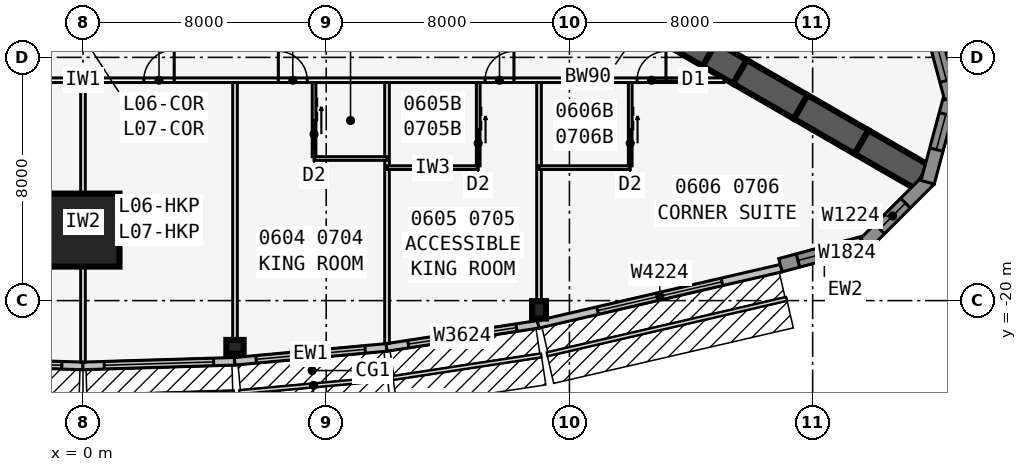
"""IFC4 building model, lengths in metres.
Left out: names, types, materials, properties, quantities, classifications, styles, units other than length and angle.
Written with IfcOpenShell. Run it as: python <this file> out.ifc"""

import sys

from ifc_helpers import new_model, si_unit, direction, frame, frame_2d, origin, origin_2d, place, context, subcontext, project, spatial, polyline, rectangle, i_section, outline, extrude, element, fill, save


model = new_model("IFC4")
c1 = context("Model", 3, precision=1e-05, world=origin(), true_north=direction((0.0, 1.0)))
c2 = subcontext(c1, "Body", "Model", "MODEL_VIEW")
j1 = project(units=[si_unit("LENGTHUNIT", "METRE"), si_unit("PLANEANGLEUNIT", "RADIAN")], contexts=[c1])
p1 = place(None, origin())
s1 = spatial("IfcSite", under=j1, at=p1, CompositionType="ELEMENT")
p2 = place(p1, origin())
s2 = spatial("IfcBuilding", under=s1, at=p2, CompositionType="ELEMENT")
p3 = place(p2, frame((0.0, 0.0, 31.9)))
s3 = spatial("IfcBuildingStorey", under=s2, at=p3, CompositionType="ELEMENT", Elevation=31.9)
p4 = place(p3, frame((16.5, -9.526, 0.0), z_axis=(0.0, 0.0, 1.0), x_axis=(0.866031398331, -0.499989616998, 0.0)))
e1 = element("IfcWall", 1, at=p4, inside=s3, PredefinedType="SHEAR", context=c2, shape_type="SweptSolid", body=[
    extrude(rectangle(XDim=4.746, YDim=0.9, at=frame_2d((2.373, 0.0))), origin(), (0.0, 0.0, 1.0), 3.4),
])
p5 = place(p4, frame((1.8, 0.0, 0.0)))
e2 = element("IfcOpeningElement", 2, at=p5, cuts=e1, PredefinedType="OPENING", context=c2, shape_type="SweptSolid", body=[
    extrude(rectangle(XDim=1.8, YDim=2.13, at=frame_2d((0.9, 1.065))), frame((0.0, 0.46, 0.0), z_axis=(0.0, -1.0, 0.0), x_axis=(1.0, 0.0, 0.0)), (0.0, 0.0, 1.0), 0.92),
])
p6 = place(p3, frame((20.61, -11.899, 0.0), z_axis=(0.0, 0.0, 1.0), x_axis=(0.866009537788, -0.500027479704, 0.0)))
e3 = element("IfcWall", 3, at=p6, inside=s3, PredefinedType="SHEAR", context=c2, shape_type="SweptSolid", body=[
    extrude(rectangle(XDim=1.155, YDim=0.9, at=frame_2d((0.577, 0.0))), origin(), (0.0, 0.0, 1.0), 3.4),
])
for number, where, z_axis, x_axis in (
    (4, (21.61, -12.477, 0.0), (0.0, 0.0, 1.0), (0.866, -0.5, 0.0)),
    (5, (23.61, -13.631, 0.0), (0.0, 0.0, 1.0), (0.866, -0.5, 0.0)),
    (6, (25.61, -14.786, 0.0), (0.0, 0.0, 1.0), (0.866, -0.5, 0.0)),
):
    element("IfcWall", number, at=place(p3, frame(where, z_axis=z_axis, x_axis=x_axis)), inside=s3, PredefinedType="SHEAR", context=c2, shape_type="SweptSolid", body=[
        extrude(rectangle(XDim=2.309, YDim=0.9, at=frame_2d((1.155, 0.0))), origin(), (0.0, 0.0, 1.0), 3.4),
    ])
for number, where, z_axis, x_axis in (
    (7, (5.0, -21.521, 0.0), (0.0, 0.0, 1.0), (0.0, -1.0, 0.0)),
    (8, (15.0, -20.303, 0.0), (0.0, 0.0, 1.0), (1.0, 0.0, 0.0)),
):
    element("IfcColumn", number, at=place(p3, frame(where, z_axis=z_axis, x_axis=x_axis)), inside=s3, PredefinedType="COLUMN", context=c2, shape_type="SweptSolid", body=[
        extrude(i_section(OverallWidth=0.455, OverallDepth=0.569, WebThickness=0.078, FlangeThickness=0.125, at=origin_2d()), origin(), (0.0, 0.0, 1.0), 3.4),
    ])
p7 = place(p3, frame((0.0, -17.68, 0.0), z_axis=(0.0, 0.0, 1.0), x_axis=(0.0, -1.0, 0.0)))
e9 = element("IfcColumn", 9, at=p7, inside=s3, PredefinedType="COLUMN", context=c2, shape_type="SweptSolid", body=[
    extrude(rectangle(XDim=2.4, YDim=2.4, at=origin_2d()), origin(), (0.0, 0.0, 1.0), 3.4),
])
p8 = place(p3, frame((-4.996, -21.996, 0.0), z_axis=(0.0, 0.0, 1.0), x_axis=(0.999537635046, -0.030405856769, 0.0)))
e10 = element("IfcWall", 10, at=p8, inside=s3, PredefinedType="STANDARD", context=c2, shape_type="SweptSolid", body=[
    extrude(rectangle(XDim=5.002, YDim=0.25, at=frame_2d((2.501, 0.0))), origin(), (0.0, 0.0, 1.0), 3.235),
])
p9 = place(p8, frame((0.701, 0.0, 0.45)))
e11 = element("IfcOpeningElement", 11, at=p9, cuts=e10, PredefinedType="OPENING", context=c2, shape_type="SweptSolid", body=[
    extrude(rectangle(XDim=3.6, YDim=2.4, at=frame_2d((1.8, 1.2))), frame((0.0, 0.135, 0.0), z_axis=(0.0, -1.0, 0.0), x_axis=(1.0, 0.0, 0.0)), (0.0, 0.0, 1.0), 0.27),
])
p10 = place(p3, frame((-0.004, -22.148, 0.0), z_axis=(0.0, 0.0, 1.0), x_axis=(0.999537635046, 0.030405856769, 0.0)))
e12 = element("IfcWall", 12, at=p10, inside=s3, PredefinedType="STANDARD", context=c2, shape_type="SweptSolid", body=[
    extrude(rectangle(XDim=5.002, YDim=0.25, at=frame_2d((2.501, 0.0))), origin(), (0.0, 0.0, 1.0), 3.235),
])
p11 = place(p10, frame((0.701, 0.0, 0.45)))
e13 = element("IfcOpeningElement", 13, at=p11, cuts=e12, PredefinedType="OPENING", context=c2, shape_type="SweptSolid", body=[
    extrude(rectangle(XDim=3.6, YDim=2.4, at=frame_2d((1.8, 1.2))), frame((0.0, 0.135, 0.0), z_axis=(0.0, -1.0, 0.0), x_axis=(1.0, 0.0, 0.0)), (0.0, 0.0, 1.0), 0.27),
])
p12 = place(p3, frame((4.989, -21.996, 0.0), z_axis=(0.0, 0.0, 1.0), x_axis=(0.995857256774, 0.090930325692, 0.0)))
e14 = element("IfcWall", 14, at=p12, inside=s3, PredefinedType="STANDARD", context=c2, shape_type="SweptSolid", body=[
    extrude(rectangle(XDim=5.021, YDim=0.25, at=frame_2d((2.51, 0.0))), origin(), (0.0, 0.0, 1.0), 3.235),
])
p13 = place(p12, frame((0.71, 0.0, 0.45)))
e15 = element("IfcOpeningElement", 15, at=p13, cuts=e14, PredefinedType="OPENING", context=c2, shape_type="SweptSolid", body=[
    extrude(rectangle(XDim=3.6, YDim=2.4, at=frame_2d((1.8, 1.2))), frame((0.0, 0.135, 0.0), z_axis=(0.0, -1.0, 0.0), x_axis=(1.0, 0.0, 0.0)), (0.0, 0.0, 1.0), 0.27),
])
p14 = place(p3, frame((9.981, -21.54, 0.0), z_axis=(0.0, 0.0, 1.0), x_axis=(0.988615403399, 0.150464561152, 0.0)))
e16 = element("IfcWall", 16, at=p14, inside=s3, PredefinedType="STANDARD", context=c2, shape_type="SweptSolid", body=[
    extrude(rectangle(XDim=5.058, YDim=0.25, at=frame_2d((2.529, 0.0))), origin(), (0.0, 0.0, 1.0), 3.235),
])
p15 = place(p14, frame((0.729, 0.0, 0.45)))
e17 = element("IfcOpeningElement", 17, at=p15, cuts=e16, PredefinedType="OPENING", context=c2, shape_type="SweptSolid", body=[
    extrude(rectangle(XDim=3.6, YDim=2.4, at=frame_2d((1.8, 1.2))), frame((0.0, 0.135, 0.0), z_axis=(0.0, -1.0, 0.0), x_axis=(1.0, 0.0, 0.0)), (0.0, 0.0, 1.0), 0.27),
])
p16 = place(p3, frame((14.972, -20.781, 0.0), z_axis=(0.0, 0.0, 1.0), x_axis=(0.974279327392, 0.225343720163, 0.0)))
e18 = element("IfcWall", 18, at=p16, inside=s3, PredefinedType="STANDARD", context=c2, shape_type="SweptSolid", body=[
    extrude(rectangle(XDim=8.211, YDim=0.25, at=frame_2d((4.105, 0.0))), origin(), (0.0, 0.0, 1.0), 3.235),
])
p17 = place(p16, frame((2.006, 0.0, 0.45)))
e19 = element("IfcOpeningElement", 19, at=p17, cuts=e18, PredefinedType="OPENING", context=c2, shape_type="SweptSolid", body=[
    extrude(rectangle(XDim=4.2, YDim=2.4, at=frame_2d((2.1, 1.2))), frame((0.0, 0.135, 0.0), z_axis=(0.0, -1.0, 0.0), x_axis=(1.0, 0.0, 0.0)), (0.0, 0.0, 1.0), 0.27),
])
p18 = place(p3, frame((22.942, -18.835, 0.0), z_axis=(0.0, 0.0, 1.0), x_axis=(0.965930548995, 0.258801419081, 0.0)))
e20 = element("IfcWall", 20, at=p18, inside=s3, PredefinedType="SOLIDWALL", context=c2, shape_type="SweptSolid", body=[
    extrude(rectangle(XDim=2.989, YDim=0.45, at=frame_2d((1.494, 0.0))), origin(), (0.0, 0.0, 1.0), 3.235),
])
p19 = place(p18, frame((0.594, 0.0, 0.45)))
e21 = element("IfcOpeningElement", 21, at=p19, cuts=e20, PredefinedType="OPENING", context=c2, shape_type="SweptSolid", body=[
    extrude(rectangle(XDim=1.8, YDim=2.4, at=frame_2d((0.9, 1.2))), frame((0.0, 0.235, 0.0), z_axis=(0.0, -1.0, 0.0), x_axis=(1.0, 0.0, 0.0)), (0.0, 0.0, 1.0), 0.47),
])
p20 = place(p3, frame((25.728, -18.12, 0.0), z_axis=(0.0, 0.0, 1.0), x_axis=(0.707025086683, 0.707188466253, 0.0)))
e22 = element("IfcWall", 22, at=p20, inside=s3, PredefinedType="SOLIDWALL", context=c2, shape_type="SweptSolid", body=[
    extrude(outline(polyline([(2.989, 0.225), (2.93, 0.225), (2.438, 0.093), (2.402, 0.225), (0.0, 0.225), (0.0, -0.225), (2.989, -0.225), (2.989, 0.225)])), origin(), (0.0, 0.0, 1.0), 3.235),
])
p21 = place(p20, frame((0.676, 0.0, 0.45)))
e23 = element("IfcOpeningElement", 23, at=p21, cuts=e22, PredefinedType="OPENING", context=c2, shape_type="SweptSolid", body=[
    extrude(rectangle(XDim=1.2, YDim=2.4, at=frame_2d((0.6, 1.2))), frame((0.0, 0.235, 0.0), z_axis=(0.0, -1.0, 0.0), x_axis=(1.0, 0.0, 0.0)), (0.0, 0.0, 1.0), 0.47),
])
p22 = place(p3, frame((27.783, -16.108, 0.0), z_axis=(0.0, 0.0, 1.0), x_axis=(0.258801419081, 0.965930548995, 0.0)))
e24 = element("IfcWall", 24, at=p22, inside=s3, PredefinedType="SOLIDWALL", context=c2, shape_type="SweptSolid", body=[
    extrude(outline(polyline([(2.989, 0.225), (0.586, 0.225), (0.551, 0.093), (0.06, 0.225), (0.0, 0.225), (0.0, -0.225), (2.989, -0.225), (2.989, 0.225)])), origin(), (0.0, 0.0, 1.0), 3.235),
])
p23 = place(p22, frame((1.113, 0.0, 0.45)))
e25 = element("IfcOpeningElement", 25, at=p23, cuts=e24, PredefinedType="OPENING", context=c2, shape_type="SweptSolid", body=[
    extrude(rectangle(XDim=1.2, YDim=2.4, at=frame_2d((0.6, 1.2))), frame((0.0, 0.235, 0.0), z_axis=(0.0, -1.0, 0.0), x_axis=(1.0, 0.0, 0.0)), (0.0, 0.0, 1.0), 0.47),
])
p24 = place(p3, frame((28.556, -13.337, 0.0), z_axis=(0.0, 0.0, 1.0), x_axis=(-0.258780998834, 0.965936019953, 0.0)))
e26 = element("IfcWall", 26, at=p24, inside=s3, PredefinedType="SOLIDWALL", context=c2, shape_type="SweptSolid", body=[
    extrude(rectangle(XDim=2.989, YDim=0.45, at=frame_2d((1.494, 0.0))), origin(), (0.0, 0.0, 1.0), 3.235),
])
p25 = place(p24, frame((0.594, 0.0, 0.45)))
e27 = element("IfcOpeningElement", 27, at=p25, cuts=e26, PredefinedType="OPENING", context=c2, shape_type="SweptSolid", body=[
    extrude(rectangle(XDim=1.8, YDim=2.4, at=frame_2d((0.9, 1.2))), frame((0.0, 0.235, 0.0), z_axis=(0.0, -1.0, 0.0), x_axis=(1.0, 0.0, 0.0)), (0.0, 0.0, 1.0), 0.47),
])
p26 = place(p3, frame((-21.086, -12.751, 0.0), z_axis=(0.0, 0.0, 1.0), x_axis=(1.0, 0.0, 0.0)))
e28 = element("IfcWall", 28, at=p26, inside=s3, PredefinedType="PARTITIONING", context=c2, shape_type="SweptSolid", body=[
    extrude(rectangle(XDim=42.172, YDim=0.15, at=frame_2d((21.086, 0.0))), origin(), (0.0, 0.0, 1.0), 3.235),
])
p27 = place(p26, frame((2.338, 0.0, 0.0)))
e29 = element("IfcOpeningElement", 29, at=p27, cuts=e28, PredefinedType="OPENING", context=c2, shape_type="SweptSolid", body=[
    extrude(rectangle(XDim=0.95, YDim=2.13, at=frame_2d((0.475, 1.065))), frame((0.0, 0.085, 0.0), z_axis=(0.0, -1.0, 0.0), x_axis=(1.0, 0.0, 0.0)), (0.0, 0.0, 1.0), 0.17),
])
p28 = place(p26, frame((12.511, 0.0, 0.0)))
e30 = element("IfcOpeningElement", 30, at=p28, cuts=e28, PredefinedType="OPENING", context=c2, shape_type="SweptSolid", body=[
    extrude(rectangle(XDim=0.95, YDim=2.13, at=frame_2d((0.475, 1.065))), frame((0.0, 0.085, 0.0), z_axis=(0.0, -1.0, 0.0), x_axis=(1.0, 0.0, 0.0)), (0.0, 0.0, 1.0), 0.17),
])
p29 = place(p26, frame((18.711, 0.0, 0.0)))
e31 = element("IfcOpeningElement", 31, at=p29, cuts=e28, PredefinedType="OPENING", context=c2, shape_type="SweptSolid", body=[
    extrude(rectangle(XDim=0.95, YDim=2.13, at=frame_2d((0.475, 1.065))), frame((0.0, 0.085, 0.0), z_axis=(0.0, -1.0, 0.0), x_axis=(1.0, 0.0, 0.0)), (0.0, 0.0, 1.0), 0.17),
])
p30 = place(p26, frame((23.086, 0.0, 0.0)))
e32 = element("IfcOpeningElement", 32, at=p30, cuts=e28, PredefinedType="OPENING", context=c2, shape_type="SweptSolid", body=[
    extrude(rectangle(XDim=1.0, YDim=2.13, at=frame_2d((0.5, 1.065))), frame((0.0, 0.085, 0.0), z_axis=(0.0, -1.0, 0.0), x_axis=(1.0, 0.0, 0.0)), (0.0, 0.0, 1.0), 0.17),
])
p31 = place(p26, frame((27.511, 0.0, 0.0)))
e33 = element("IfcOpeningElement", 33, at=p31, cuts=e28, PredefinedType="OPENING", context=c2, shape_type="SweptSolid", body=[
    extrude(rectangle(XDim=0.95, YDim=2.13, at=frame_2d((0.475, 1.065))), frame((0.0, 0.085, 0.0), z_axis=(0.0, -1.0, 0.0), x_axis=(1.0, 0.0, 0.0)), (0.0, 0.0, 1.0), 0.17),
])
p32 = place(p26, frame((34.311, 0.0, 0.0)))
e34 = element("IfcOpeningElement", 34, at=p32, cuts=e28, PredefinedType="OPENING", context=c2, shape_type="SweptSolid", body=[
    extrude(rectangle(XDim=0.95, YDim=2.13, at=frame_2d((0.475, 1.065))), frame((0.0, 0.085, 0.0), z_axis=(0.0, -1.0, 0.0), x_axis=(1.0, 0.0, 0.0)), (0.0, 0.0, 1.0), 0.17),
])
p33 = place(p26, frame((39.311, 0.0, 0.0)))
e35 = element("IfcOpeningElement", 35, at=p33, cuts=e28, PredefinedType="OPENING", context=c2, shape_type="SweptSolid", body=[
    extrude(rectangle(XDim=0.95, YDim=2.13, at=frame_2d((0.475, 1.065))), frame((0.0, 0.085, 0.0), z_axis=(0.0, -1.0, 0.0), x_axis=(1.0, 0.0, 0.0)), (0.0, 0.0, 1.0), 0.17),
])
p34 = place(p3, frame((0.0, -12.826, 0.0), z_axis=(0.0, 0.0, 1.0), x_axis=(0.0, -1.0, 0.0)))
e36 = element("IfcWall", 36, at=p34, inside=s3, PredefinedType="PARTITIONING", context=c2, shape_type="SweptSolid", body=[
    extrude(rectangle(XDim=9.196, YDim=0.15, at=frame_2d((4.598, 0.0))), origin(), (0.0, 0.0, 1.0), 2.389),
])
p35 = place(p3, frame((5.0, -12.826, 0.0), z_axis=(0.0, 0.0, 1.0), x_axis=(0.0, -1.0, 0.0)))
e37 = element("IfcWall", 37, at=p35, inside=s3, PredefinedType="PARTITIONING", context=c2, shape_type="SweptSolid", body=[
    extrude(rectangle(XDim=9.043, YDim=0.15, at=frame_2d((4.521, 0.0))), origin(), (0.0, 0.0, 1.0), 2.389),
])
p36 = place(p3, frame((10.0, -12.826, 0.0), z_axis=(0.0, 0.0, 1.0), x_axis=(0.0, -1.0, 0.0)))
e38 = element("IfcWall", 38, at=p36, inside=s3, PredefinedType="PARTITIONING", context=c2, shape_type="SweptSolid", body=[
    extrude(rectangle(XDim=8.584, YDim=0.15, at=frame_2d((4.292, 0.0))), origin(), (0.0, 0.0, 1.0), 2.389),
])
p37 = place(p3, frame((15.0, -12.826, 0.0), z_axis=(0.0, 0.0, 1.0), x_axis=(0.0, -1.0, 0.0)))
e39 = element("IfcWall", 39, at=p37, inside=s3, PredefinedType="PARTITIONING", context=c2, shape_type="SweptSolid", body=[
    extrude(rectangle(XDim=7.82, YDim=0.15, at=frame_2d((3.91, 0.0))), origin(), (0.0, 0.0, 1.0), 2.389),
])
p38 = place(p3, frame((7.6, -15.326, 0.0), z_axis=(0.0, 0.0, 1.0), x_axis=(1.0, 0.0, 0.0)))
e40 = element("IfcWall", 40, at=p38, inside=s3, PredefinedType="PLUMBINGWALL", context=c2, shape_type="SweptSolid", body=[
    extrude(rectangle(XDim=2.4, YDim=0.12, at=frame_2d((1.2, 0.0))), origin(), (0.0, 0.0, 1.0), 3.235),
])
p39 = place(p3, frame((7.6, -12.826, 0.0), z_axis=(0.0, 0.0, 1.0), x_axis=(0.0, -1.0, 0.0)))
e41 = element("IfcWall", 41, at=p39, inside=s3, PredefinedType="PLUMBINGWALL", context=c2, shape_type="SweptSolid", body=[
    extrude(rectangle(XDim=2.44, YDim=0.12, at=frame_2d((1.22, 0.0))), origin(), (0.0, 0.0, 1.0), 3.235),
])
p40 = place(p39, frame((1.25, 0.0, 0.0)))
e42 = element("IfcOpeningElement", 42, at=p40, cuts=e41, PredefinedType="OPENING", context=c2, shape_type="SweptSolid", body=[
    extrude(rectangle(XDim=0.9, YDim=2.13, at=frame_2d((0.45, 1.065))), frame((0.0, 0.07, 0.0), z_axis=(0.0, -1.0, 0.0), x_axis=(1.0, 0.0, 0.0)), (0.0, 0.0, 1.0), 0.14),
])
p41 = place(p3, frame((10.0, -15.626, 0.0), z_axis=(0.0, 0.0, 1.0), x_axis=(1.0, 0.0, 0.0)))
e43 = element("IfcWall", 43, at=p41, inside=s3, PredefinedType="PLUMBINGWALL", context=c2, shape_type="SweptSolid", body=[
    extrude(rectangle(XDim=3.0, YDim=0.12, at=frame_2d((1.5, 0.0))), origin(), (0.0, 0.0, 1.0), 3.235),
])
p42 = place(p3, frame((13.0, -12.826, 0.0), z_axis=(0.0, 0.0, 1.0), x_axis=(0.0, -1.0, 0.0)))
e44 = element("IfcWall", 44, at=p42, inside=s3, PredefinedType="PLUMBINGWALL", context=c2, shape_type="SweptSolid", body=[
    extrude(rectangle(XDim=2.74, YDim=0.12, at=frame_2d((1.37, 0.0))), origin(), (0.0, 0.0, 1.0), 3.235),
])
p43 = place(p42, frame((1.55, 0.0, 0.0)))
e45 = element("IfcOpeningElement", 45, at=p43, cuts=e44, PredefinedType="OPENING", context=c2, shape_type="SweptSolid", body=[
    extrude(rectangle(XDim=0.9, YDim=2.13, at=frame_2d((0.45, 1.065))), frame((0.0, 0.07, 0.0), z_axis=(0.0, -1.0, 0.0), x_axis=(1.0, 0.0, 0.0)), (0.0, 0.0, 1.0), 0.14),
])
p44 = place(p3, frame((15.0, -15.626, 0.0), z_axis=(0.0, 0.0, 1.0), x_axis=(1.0, 0.0, 0.0)))
e46 = element("IfcWall", 46, at=p44, inside=s3, PredefinedType="PLUMBINGWALL", context=c2, shape_type="SweptSolid", body=[
    extrude(rectangle(XDim=3.0, YDim=0.12, at=frame_2d((1.5, 0.0))), origin(), (0.0, 0.0, 1.0), 3.235),
])
p45 = place(p3, frame((18.0, -12.826, 0.0), z_axis=(0.0, 0.0, 1.0), x_axis=(0.0, -1.0, 0.0)))
e47 = element("IfcWall", 47, at=p45, inside=s3, PredefinedType="PLUMBINGWALL", context=c2, shape_type="SweptSolid", body=[
    extrude(rectangle(XDim=2.74, YDim=0.12, at=frame_2d((1.37, 0.0))), origin(), (0.0, 0.0, 1.0), 3.235),
])
p46 = place(p45, frame((1.55, 0.0, 0.0)))
e48 = element("IfcOpeningElement", 48, at=p46, cuts=e47, PredefinedType="OPENING", context=c2, shape_type="SweptSolid", body=[
    extrude(rectangle(XDim=0.9, YDim=2.13, at=frame_2d((0.45, 1.065))), frame((0.0, 0.07, 0.0), z_axis=(0.0, -1.0, 0.0), x_axis=(1.0, 0.0, 0.0)), (0.0, 0.0, 1.0), 0.14),
])
p47 = place(p9, origin())
e49 = element("IfcWindow", 49, at=p47, inside=s3, PartitioningType="SINGLE_PANEL", PredefinedType="WINDOW", context=c2, shape_type="SweptSolid", body=[
    extrude(rectangle(XDim=3.6, YDim=2.4, at=frame_2d((1.8, 1.2))), frame((0.0, 0.03, 0.0), z_axis=(0.0, -1.0, 0.0), x_axis=(1.0, 0.0, 0.0)), (0.0, 0.0, 1.0), 0.06),
])
fill(e11, e49)
p48 = place(p11, origin())
e50 = element("IfcWindow", 50, at=p48, inside=s3, PartitioningType="SINGLE_PANEL", PredefinedType="WINDOW", context=c2, shape_type="SweptSolid", body=[
    extrude(rectangle(XDim=3.6, YDim=2.4, at=frame_2d((1.8, 1.2))), frame((0.0, 0.03, 0.0), z_axis=(0.0, -1.0, 0.0), x_axis=(1.0, 0.0, 0.0)), (0.0, 0.0, 1.0), 0.06),
])
fill(e13, e50)
p49 = place(p13, origin())
e51 = element("IfcWindow", 51, at=p49, inside=s3, PartitioningType="SINGLE_PANEL", PredefinedType="WINDOW", context=c2, shape_type="SweptSolid", body=[
    extrude(rectangle(XDim=3.6, YDim=2.4, at=frame_2d((1.8, 1.2))), frame((0.0, 0.03, 0.0), z_axis=(0.0, -1.0, 0.0), x_axis=(1.0, 0.0, 0.0)), (0.0, 0.0, 1.0), 0.06),
])
fill(e15, e51)
p50 = place(p15, origin())
e52 = element("IfcWindow", 52, at=p50, inside=s3, PartitioningType="SINGLE_PANEL", PredefinedType="WINDOW", context=c2, shape_type="SweptSolid", body=[
    extrude(rectangle(XDim=3.6, YDim=2.4, at=frame_2d((1.8, 1.2))), frame((0.0, 0.03, 0.0), z_axis=(0.0, -1.0, 0.0), x_axis=(1.0, 0.0, 0.0)), (0.0, 0.0, 1.0), 0.06),
])
fill(e17, e52)
p51 = place(p17, origin())
e53 = element("IfcWindow", 53, at=p51, inside=s3, PartitioningType="SINGLE_PANEL", PredefinedType="WINDOW", context=c2, shape_type="SweptSolid", body=[
    extrude(rectangle(XDim=4.2, YDim=2.4, at=frame_2d((2.1, 1.2))), frame((0.0, 0.03, 0.0), z_axis=(0.0, -1.0, 0.0), x_axis=(1.0, 0.0, 0.0)), (0.0, 0.0, 1.0), 0.06),
])
fill(e19, e53)
p52 = place(p19, origin())
e54 = element("IfcWindow", 54, at=p52, inside=s3, PartitioningType="SINGLE_PANEL", PredefinedType="WINDOW", context=c2, shape_type="SweptSolid", body=[
    extrude(rectangle(XDim=1.8, YDim=2.4, at=frame_2d((0.9, 1.2))), frame((0.0, 0.03, 0.0), z_axis=(0.0, -1.0, 0.0), x_axis=(1.0, 0.0, 0.0)), (0.0, 0.0, 1.0), 0.06),
])
fill(e21, e54)
p53 = place(p21, origin())
e55 = element("IfcWindow", 55, at=p53, inside=s3, PartitioningType="SINGLE_PANEL", PredefinedType="WINDOW", context=c2, shape_type="SweptSolid", body=[
    extrude(rectangle(XDim=1.2, YDim=2.4, at=frame_2d((0.6, 1.2))), frame((0.0, 0.03, 0.0), z_axis=(0.0, -1.0, 0.0), x_axis=(1.0, 0.0, 0.0)), (0.0, 0.0, 1.0), 0.06),
])
fill(e23, e55)
p54 = place(p23, origin())
e56 = element("IfcWindow", 56, at=p54, inside=s3, PartitioningType="SINGLE_PANEL", PredefinedType="WINDOW", context=c2, shape_type="SweptSolid", body=[
    extrude(rectangle(XDim=1.2, YDim=2.4, at=frame_2d((0.6, 1.2))), frame((0.0, 0.03, 0.0), z_axis=(0.0, -1.0, 0.0), x_axis=(1.0, 0.0, 0.0)), (0.0, 0.0, 1.0), 0.06),
])
fill(e25, e56)
p55 = place(p25, origin())
e57 = element("IfcWindow", 57, at=p55, inside=s3, PartitioningType="SINGLE_PANEL", PredefinedType="WINDOW", context=c2, shape_type="SweptSolid", body=[
    extrude(rectangle(XDim=1.8, YDim=2.4, at=frame_2d((0.9, 1.2))), frame((0.0, 0.03, 0.0), z_axis=(0.0, -1.0, 0.0), x_axis=(1.0, 0.0, 0.0)), (0.0, 0.0, 1.0), 0.06),
])
fill(e27, e57)
p56 = place(p30, origin())
e58 = element("IfcDoor", 58, at=p56, inside=s3, OperationType="SINGLE_SWING_RIGHT", PredefinedType="DOOR", context=c2, shape_type="SweptSolid", body=[
    extrude(rectangle(XDim=1.0, YDim=2.13, at=frame_2d((0.5, 1.065))), frame((0.0, 0.025, 0.0), z_axis=(0.0, -1.0, 0.0), x_axis=(1.0, 0.0, 0.0)), (0.0, 0.0, 1.0), 0.05),
])
fill(e32, e58)
p57 = place(p40, origin())
e59 = element("IfcDoor", 59, at=p57, inside=s3, OperationType="SLIDING_TO_LEFT", PredefinedType="DOOR", context=c2, shape_type="SweptSolid", body=[
    extrude(rectangle(XDim=0.9, YDim=2.13, at=frame_2d((0.45, 1.065))), frame((0.0, 0.025, 0.0), z_axis=(0.0, -1.0, 0.0), x_axis=(1.0, 0.0, 0.0)), (0.0, 0.0, 1.0), 0.05),
])
fill(e42, e59)
p58 = place(p31, origin())
e60 = element("IfcDoor", 60, at=p58, inside=s3, OperationType="SINGLE_SWING_LEFT", PredefinedType="DOOR", context=c2, shape_type="SweptSolid", body=[
    extrude(rectangle(XDim=0.95, YDim=2.13, at=frame_2d((0.475, 1.065))), frame((0.0, 0.025, 0.0), z_axis=(0.0, -1.0, 0.0), x_axis=(1.0, 0.0, 0.0)), (0.0, 0.0, 1.0), 0.05),
])
fill(e33, e60)
p59 = place(p43, origin())
e61 = element("IfcDoor", 61, at=p59, inside=s3, OperationType="SLIDING_TO_LEFT", PredefinedType="DOOR", context=c2, shape_type="SweptSolid", body=[
    extrude(rectangle(XDim=0.9, YDim=2.13, at=frame_2d((0.45, 1.065))), frame((0.0, 0.025, 0.0), z_axis=(0.0, -1.0, 0.0), x_axis=(1.0, 0.0, 0.0)), (0.0, 0.0, 1.0), 0.05),
])
fill(e45, e61)
p60 = place(p32, origin())
e62 = element("IfcDoor", 62, at=p60, inside=s3, OperationType="SINGLE_SWING_RIGHT", PredefinedType="DOOR", context=c2, shape_type="SweptSolid", body=[
    extrude(rectangle(XDim=0.95, YDim=2.13, at=frame_2d((0.475, 1.065))), frame((0.0, 0.025, 0.0), z_axis=(0.0, -1.0, 0.0), x_axis=(1.0, 0.0, 0.0)), (0.0, 0.0, 1.0), 0.05),
])
fill(e34, e62)
p61 = place(p46, origin())
e63 = element("IfcDoor", 63, at=p61, inside=s3, OperationType="SLIDING_TO_LEFT", PredefinedType="DOOR", context=c2, shape_type="SweptSolid", body=[
    extrude(rectangle(XDim=0.9, YDim=2.13, at=frame_2d((0.45, 1.065))), frame((0.0, 0.025, 0.0), z_axis=(0.0, -1.0, 0.0), x_axis=(1.0, 0.0, 0.0)), (0.0, 0.0, 1.0), 0.05),
])
fill(e48, e63)
p62 = place(p33, origin())
e64 = element("IfcDoor", 64, at=p62, inside=s3, OperationType="SINGLE_SWING_RIGHT", PredefinedType="DOOR", context=c2, shape_type="SweptSolid", body=[
    extrude(rectangle(XDim=0.95, YDim=2.13, at=frame_2d((0.475, 1.065))), frame((0.0, 0.025, 0.0), z_axis=(0.0, -1.0, 0.0), x_axis=(1.0, 0.0, 0.0)), (0.0, 0.0, 1.0), 0.05),
])
fill(e35, e64)
save(model, sys.argv[1])
